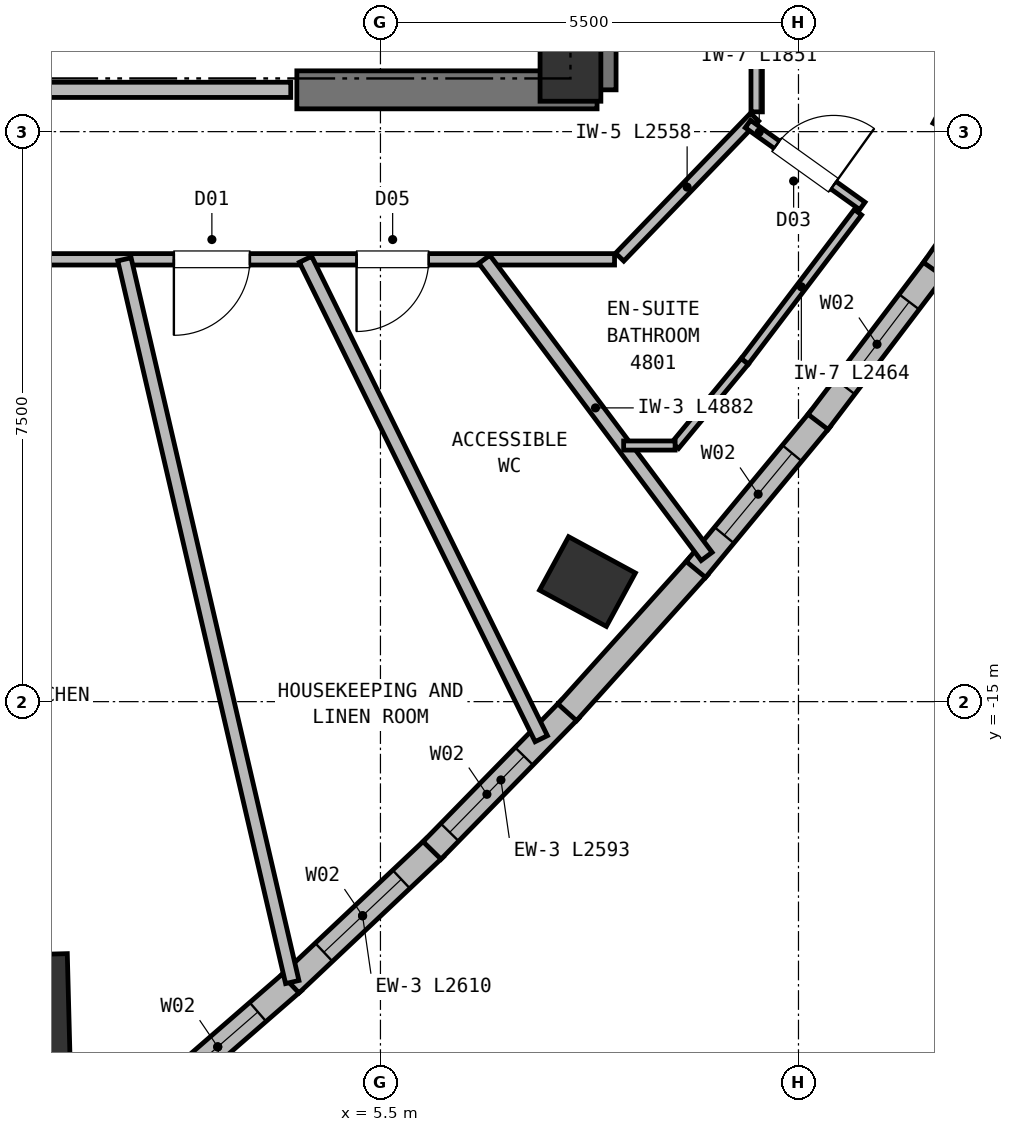
"""IFC4 building model, lengths in metres.
Left out: names, types, materials, properties, quantities, classifications, styles, units other than length and angle.
Written with IfcOpenShell. Run it as: python <this file> out.ifc"""

import sys

from ifc_helpers import new_model, si_unit, direction, frame, frame_2d, origin, origin_2d, place, context, subcontext, project, spatial, rectangle, extrude, element, fill, save


model = new_model("IFC4")
c1 = context("Model", 3, precision=1e-05, world=origin(), true_north=direction((0.0, 1.0)))
c2 = subcontext(c1, "Body", "Model", "MODEL_VIEW")
j1 = project(units=[si_unit("LENGTHUNIT", "METRE"), si_unit("PLANEANGLEUNIT", "RADIAN")], contexts=[c1])
p1 = place(None, origin())
s1 = spatial("IfcSite", under=j1, at=p1, CompositionType="ELEMENT")
p2 = place(p1, origin())
s2 = spatial("IfcBuilding", under=s1, at=p2, CompositionType="ELEMENT")
p3 = place(p2, frame((0.0, 0.0, 182.75)))
s3 = spatial("IfcBuildingStorey", under=s2, at=p3, CompositionType="ELEMENT", Elevation=182.75)
p4 = place(p3, frame((8.0, -6.6, 0.0), z_axis=(0.0, 0.0, 1.0), x_axis=(1.0, 0.0, 0.0)))
e1 = element("IfcColumn", 1, at=p4, inside=s3, PredefinedType="COLUMN", context=c2, shape_type="SweptSolid", body=[
    extrude(rectangle(XDim=0.8, YDim=1.0, at=origin_2d()), origin(), (0.0, 0.0, 1.0), 3.8),
])
p5 = place(p3, frame((4.4, -6.95, 0.0), z_axis=(0.0, 0.0, 1.0), x_axis=(1.0, 0.0, 0.0)))
e2 = element("IfcWall", 2, at=p5, inside=s3, PredefinedType="SHEAR", context=c2, shape_type="SweptSolid", body=[
    extrude(rectangle(XDim=3.95, YDim=0.5, at=frame_2d((1.975, 0.0))), origin(), (0.0, 0.0, 1.0), 3.55),
])
p6 = place(p3, frame((8.35, -6.95, 0.0), z_axis=(0.0, 0.0, 1.0), x_axis=(0.0, 1.0, 0.0)))
e3 = element("IfcWall", 3, at=p6, inside=s3, PredefinedType="SHEAR", context=c2, shape_type="SweptSolid", body=[
    extrude(rectangle(XDim=8.1, YDim=0.5, at=frame_2d((4.05, 0.0))), origin(), (0.0, 0.0, 1.0), 3.55),
])
p7 = place(p3, frame((0.499, -19.064, 0.0), z_axis=(0.0, 0.0, 1.0), x_axis=(-0.026176948308, 0.999657324976, 0.0)))
e4 = element("IfcColumn", 4, at=p7, inside=s3, PredefinedType="COLUMN", context=c2, shape_type="SweptSolid", body=[
    extrude(rectangle(XDim=1.45, YDim=1.8, at=origin_2d()), origin(), (0.0, 0.0, 1.0), 3.8),
])
for number, where, z_axis, x_axis in (
    (5, (8.224, -13.42, 0.0), (0.0, 0.0, 1.0), (0.477, 0.879, 0.0)),
    (6, (13.4, -7.276, 0.0), (0.0, 0.0, 1.0), (0.477, 0.879, 0.0)),
):
    element("IfcColumn", number, at=place(p3, frame(where, z_axis=z_axis, x_axis=x_axis)), inside=s3, PredefinedType="COLUMN", context=c2, shape_type="SweptSolid", body=[
        extrude(rectangle(XDim=0.8, YDim=1.0, at=origin_2d()), origin(), (0.0, 0.0, 1.0), 3.8),
    ])
p8 = place(p3, frame((4.352, -18.679, 0.0), z_axis=(0.0, 0.0, 1.0), x_axis=(-0.754647459821, -0.656130483505, 0.0)))
e7 = element("IfcWall", 7, at=p8, inside=s3, PredefinedType="SOLIDWALL", context=c2, shape_type="SweptSolid", body=[
    extrude(rectangle(XDim=2.632, YDim=0.33, at=frame_2d((1.316, 0.0))), origin(), (0.0, 0.0, 1.0), 3.55),
])
p9 = place(p8, frame((0.616, 0.0, 0.72)))
e8 = element("IfcOpeningElement", 8, at=p9, cuts=e7, PredefinedType="OPENING", context=c2, shape_type="SweptSolid", body=[
    extrude(rectangle(XDim=1.4, YDim=1.84, at=frame_2d((0.7, 0.92))), frame((0.0, 0.175, 0.0), z_axis=(0.0, -1.0, 0.0), x_axis=(1.0, 0.0, 0.0)), (0.0, 0.0, 1.0), 0.35),
])
p10 = place(p3, frame((6.215, -16.922, 0.0), z_axis=(0.0, 0.0, 1.0), x_axis=(-0.72774946529, -0.685843069346, 0.0)))
e9 = element("IfcWall", 9, at=p10, inside=s3, PredefinedType="SOLIDWALL", context=c2, shape_type="SweptSolid", body=[
    extrude(rectangle(XDim=2.61, YDim=0.33, at=frame_2d((1.305, 0.0))), origin(), (0.0, 0.0, 1.0), 3.55),
])
p11 = place(p10, frame((0.605, 0.0, 0.72)))
e10 = element("IfcOpeningElement", 10, at=p11, cuts=e9, PredefinedType="OPENING", context=c2, shape_type="SweptSolid", body=[
    extrude(rectangle(XDim=1.4, YDim=1.84, at=frame_2d((0.7, 0.92))), frame((0.0, 0.175, 0.0), z_axis=(0.0, -1.0, 0.0), x_axis=(1.0, 0.0, 0.0)), (0.0, 0.0, 1.0), 0.35),
])
p12 = place(p3, frame((7.991, -15.104, 0.0), z_axis=(0.0, 0.0, 1.0), x_axis=(-0.699057723408, -0.71506524132, 0.0)))
e11 = element("IfcWall", 11, at=p12, inside=s3, PredefinedType="SOLIDWALL", context=c2, shape_type="SweptSolid", body=[
    extrude(rectangle(XDim=2.593, YDim=0.33, at=frame_2d((1.296, 0.0))), origin(), (0.0, 0.0, 1.0), 3.55),
])
p13 = place(p12, frame((0.86, 0.0, 0.72)))
e12 = element("IfcOpeningElement", 12, at=p13, cuts=e11, PredefinedType="OPENING", context=c2, shape_type="SweptSolid", body=[
    extrude(rectangle(XDim=1.4, YDim=1.84, at=frame_2d((0.7, 0.92))), frame((0.0, 0.175, 0.0), z_axis=(0.0, -1.0, 0.0), x_axis=(1.0, 0.0, 0.0)), (0.0, 0.0, 1.0), 0.35),
])
p14 = place(p3, frame((9.683, -13.223, 0.0), z_axis=(0.0, 0.0, 1.0), x_axis=(-0.668980419183, -0.743280027143, 0.0)))
e13 = element("IfcWall", 13, at=p14, inside=s3, PredefinedType="SOLIDWALL", context=c2, shape_type="SweptSolid", body=[
    extrude(rectangle(XDim=2.579, YDim=0.33, at=frame_2d((1.29, 0.0))), origin(), (0.0, 0.0, 1.0), 3.55),
])
p15 = place(p3, frame((11.289, -11.28, 0.0), z_axis=(0.0, 0.0, 1.0), x_axis=(-0.637443312207, -0.77049725744, 0.0)))
e14 = element("IfcWall", 14, at=p15, inside=s3, PredefinedType="SOLIDWALL", context=c2, shape_type="SweptSolid", body=[
    extrude(rectangle(XDim=2.571, YDim=0.33, at=frame_2d((1.285, 0.0))), origin(), (0.0, 0.0, 1.0), 3.55),
])
p16 = place(p15, frame((0.585, 0.0, 0.72)))
e15 = element("IfcOpeningElement", 15, at=p16, cuts=e14, PredefinedType="OPENING", context=c2, shape_type="SweptSolid", body=[
    extrude(rectangle(XDim=1.4, YDim=1.84, at=frame_2d((0.7, 0.92))), frame((0.0, 0.175, 0.0), z_axis=(0.0, -1.0, 0.0), x_axis=(1.0, 0.0, 0.0)), (0.0, 0.0, 1.0), 0.35),
])
p17 = place(p3, frame((12.809, -9.275, 0.0), z_axis=(0.0, 0.0, 1.0), x_axis=(-0.604617593392, -0.796515891719, 0.0)))
e16 = element("IfcWall", 16, at=p17, inside=s3, PredefinedType="SOLIDWALL", context=c2, shape_type="SweptSolid", body=[
    extrude(rectangle(XDim=2.566, YDim=0.33, at=frame_2d((1.283, 0.0))), origin(), (0.0, 0.0, 1.0), 3.55),
])
p18 = place(p17, frame((0.583, 0.0, 0.72)))
e17 = element("IfcOpeningElement", 17, at=p18, cuts=e16, PredefinedType="OPENING", context=c2, shape_type="SweptSolid", body=[
    extrude(rectangle(XDim=1.4, YDim=1.84, at=frame_2d((0.7, 0.92))), frame((0.0, 0.175, 0.0), z_axis=(0.0, -1.0, 0.0), x_axis=(1.0, 0.0, 0.0)), (0.0, 0.0, 1.0), 0.35),
])
p19 = place(p3, frame((14.244, -7.209, 0.0), z_axis=(0.0, 0.0, 1.0), x_axis=(-0.5707327312, -0.821135889812, 0.0)))
e18 = element("IfcWall", 18, at=p19, inside=s3, PredefinedType="SOLIDWALL", context=c2, shape_type="SweptSolid", body=[
    extrude(rectangle(XDim=2.566, YDim=0.33, at=frame_2d((1.283, 0.0))), origin(), (0.0, 0.0, 1.0), 3.55),
])
p20 = place(p3, frame((-4.32, -6.95, 0.0), z_axis=(0.0, 0.0, 1.0), x_axis=(1.0, 0.0, 0.0)))
e19 = element("IfcWall", 19, at=p20, inside=s3, PredefinedType="PARTITIONING", context=c2, shape_type="SweptSolid", body=[
    extrude(rectangle(XDim=8.64, YDim=0.2, at=frame_2d((4.32, 0.0))), origin(), (0.0, 0.0, 1.0), 3.55),
])
p21 = place(p3, frame((8.58, -9.18, 0.0), z_axis=(0.0, 0.0, 1.0), x_axis=(-1.0, 0.0, 0.0)))
e20 = element("IfcWall", 20, at=p21, inside=s3, PredefinedType="PARTITIONING", context=c2, shape_type="SweptSolid", body=[
    extrude(rectangle(XDim=17.16, YDim=0.15, at=frame_2d((8.58, 0.0))), origin(), (0.0, 0.0, 1.0), 3.23),
])
p22 = place(p21, frame((2.444, 0.0, 0.0)))
e21 = element("IfcOpeningElement", 21, at=p22, cuts=e20, PredefinedType="OPENING", context=c2, shape_type="SweptSolid", body=[
    extrude(rectangle(XDim=0.95, YDim=2.1, at=frame_2d((0.475, 1.05))), frame((0.0, 0.085, 0.0), z_axis=(0.0, -1.0, 0.0), x_axis=(1.0, 0.0, 0.0)), (0.0, 0.0, 1.0), 0.17),
])
p23 = place(p21, frame((4.798, 0.0, 0.0)))
e22 = element("IfcOpeningElement", 22, at=p23, cuts=e20, PredefinedType="OPENING", context=c2, shape_type="SweptSolid", body=[
    extrude(rectangle(XDim=1.0, YDim=2.15, at=frame_2d((0.5, 1.075))), frame((0.0, 0.085, 0.0), z_axis=(0.0, -1.0, 0.0), x_axis=(1.0, 0.0, 0.0)), (0.0, 0.0, 1.0), 0.17),
])
p24 = place(p21, frame((12.096, 0.0, 0.0)))
e23 = element("IfcOpeningElement", 23, at=p24, cuts=e20, PredefinedType="OPENING", context=c2, shape_type="SweptSolid", body=[
    extrude(rectangle(XDim=1.06, YDim=2.15, at=frame_2d((0.53, 1.075))), frame((0.0, 0.085, 0.0), z_axis=(0.0, -1.0, 0.0), x_axis=(1.0, 0.0, 0.0)), (0.0, 0.0, 1.0), 0.17),
])
p25 = place(p21, frame((8.137, 0.0, 0.0)))
e24 = element("IfcOpeningElement", 24, at=p25, cuts=e20, PredefinedType="OPENING", context=c2, shape_type="SweptSolid", body=[
    extrude(rectangle(XDim=1.0, YDim=2.15, at=frame_2d((0.5, 1.075))), frame((0.0, 0.085, 0.0), z_axis=(0.0, -1.0, 0.0), x_axis=(1.0, 0.0, 0.0)), (0.0, 0.0, 1.0), 0.17),
])
p26 = place(p3, frame((10.422, -7.309, 0.0), z_axis=(0.0, 0.0, 1.0), x_axis=(-0.693764562202, -0.720201869085, 0.0)))
e25 = element("IfcWall", 25, at=p26, inside=s3, PredefinedType="PARTITIONING", context=c2, shape_type="SweptSolid", body=[
    extrude(rectangle(XDim=2.558, YDim=0.15, at=frame_2d((1.279, 0.0))), origin(), (0.0, 0.0, 1.0), 3.23),
])
p27 = place(p3, frame((10.45, 7.24, 0.0), z_axis=(0.0, 0.0, 1.0), x_axis=(0.0, -1.0, 0.0)))
e26 = element("IfcWall", 26, at=p27, inside=s3, PredefinedType="PARTITIONING", context=c2, shape_type="SweptSolid", body=[
    extrude(rectangle(XDim=14.48, YDim=0.15, at=frame_2d((7.24, 0.0))), origin(), (0.0, 0.0, 1.0), 3.55),
])
p28 = place(p27, frame((11.674, 0.0, 0.0)))
e27 = element("IfcOpeningElement", 27, at=p28, cuts=e26, PredefinedType="OPENING", context=c2, shape_type="SweptSolid", body=[
    extrude(rectangle(XDim=1.06, YDim=2.15, at=frame_2d((0.53, 1.075))), frame((0.0, 0.085, 0.0), z_axis=(0.0, -1.0, 0.0), x_axis=(1.0, 0.0, 0.0)), (0.0, 0.0, 1.0), 0.17),
])
p29 = place(p27, frame((5.006, 0.0, 0.0)))
e28 = element("IfcOpeningElement", 28, at=p29, cuts=e26, PredefinedType="OPENING", context=c2, shape_type="SweptSolid", body=[
    extrude(rectangle(XDim=1.0, YDim=2.15, at=frame_2d((0.5, 1.075))), frame((0.0, 0.085, 0.0), z_axis=(0.0, -1.0, 0.0), x_axis=(1.0, 0.0, 0.0)), (0.0, 0.0, 1.0), 0.17),
])
p30 = place(p3, frame((6.867, -9.18, 0.0), z_axis=(0.0, 0.0, 1.0), x_axis=(0.598991453889, -0.800755417195, 0.0)))
e29 = element("IfcWall", 29, at=p30, inside=s3, PredefinedType="PARTITIONING", context=c2, shape_type="SweptSolid", body=[
    extrude(rectangle(XDim=4.883, YDim=0.18, at=frame_2d((2.441, 0.0))), origin(), (0.0, 0.0, 1.0), 3.55),
])
p31 = place(p3, frame((10.335, -7.399, 0.0), z_axis=(0.0, 0.0, 1.0), x_axis=(0.813020012063, -0.582235742621, 0.0)))
e30 = element("IfcWall", 30, at=p31, inside=s3, PredefinedType="PARTITIONING", context=c2, shape_type="SweptSolid", body=[
    extrude(rectangle(XDim=1.851, YDim=0.12, at=frame_2d((0.926, 0.0))), origin(), (0.0, 0.0, 1.0), 3.55),
])
p32 = place(p31, frame((0.466, 0.0, 0.0)))
e31 = element("IfcOpeningElement", 31, at=p32, cuts=e30, PredefinedType="OPENING", context=c2, shape_type="SweptSolid", body=[
    extrude(rectangle(XDim=0.92, YDim=2.1, at=frame_2d((0.46, 1.05))), frame((0.0, 0.07, 0.0), z_axis=(0.0, -1.0, 0.0), x_axis=(1.0, 0.0, 0.0)), (0.0, 0.0, 1.0), 0.14),
])
p33 = place(p3, frame((10.293, -10.523, 0.0), z_axis=(0.0, 0.0, 1.0), x_axis=(0.604651038728, 0.796490502998, 0.0)))
e32 = element("IfcWall", 32, at=p33, inside=s3, PredefinedType="PARTITIONING", context=c2, shape_type="SweptSolid", body=[
    extrude(rectangle(XDim=2.464, YDim=0.12, at=frame_2d((1.232, 0.0))), origin(), (0.0, 0.0, 1.0), 3.55),
])
p34 = place(p3, frame((9.377, -11.63, 0.0), z_axis=(0.0, 0.0, 1.0), x_axis=(0.63745644053, 0.770486396003, 0.0)))
e33 = element("IfcWall", 33, at=p34, inside=s3, PredefinedType="PARTITIONING", context=c2, shape_type="SweptSolid", body=[
    extrude(rectangle(XDim=1.437, YDim=0.12, at=frame_2d((0.719, 0.0))), origin(), (0.0, 0.0, 1.0), 3.55),
])
p35 = place(p3, frame((8.7, -11.63, 0.0), z_axis=(0.0, 0.0, 1.0), x_axis=(1.0, 0.0, 0.0)))
e34 = element("IfcWall", 34, at=p35, inside=s3, PredefinedType="PARTITIONING", context=c2, shape_type="SweptSolid", body=[
    extrude(rectangle(XDim=0.677, YDim=0.12, at=frame_2d((0.338, 0.0))), origin(), (0.0, 0.0, 1.0), 3.55),
])
p36 = place(p3, frame((2.132, -9.18, 0.0), z_axis=(0.0, 0.0, 1.0), x_axis=(0.226196232917, -0.974081754379, 0.0)))
e35 = element("IfcWall", 35, at=p36, inside=s3, PredefinedType="PARTITIONING", context=c2, shape_type="SweptSolid", body=[
    extrude(rectangle(XDim=9.762, YDim=0.18, at=frame_2d((4.881, 0.0))), origin(), (0.0, 0.0, 1.0), 3.55),
])
p37 = place(p3, frame((4.514, -9.18, 0.0), z_axis=(0.0, 0.0, 1.0), x_axis=(0.441285267702, -0.897366877319, 0.0)))
e36 = element("IfcWall", 36, at=p37, inside=s3, PredefinedType="PARTITIONING", context=c2, shape_type="SweptSolid", body=[
    extrude(rectangle(XDim=7.029, YDim=0.18, at=frame_2d((3.515, 0.0))), origin(), (0.0, 0.0, 1.0), 3.55),
])
p38 = place(p9, origin())
e37 = element("IfcWindow", 37, at=p38, inside=s3, PartitioningType="SINGLE_PANEL", PredefinedType="WINDOW", context=c2, shape_type="SweptSolid", body=[
    extrude(rectangle(XDim=1.4, YDim=1.84, at=frame_2d((0.7, 0.92))), frame((0.0, 0.03, 0.0), z_axis=(0.0, -1.0, 0.0), x_axis=(1.0, 0.0, 0.0)), (0.0, 0.0, 1.0), 0.06),
])
fill(e8, e37)
p39 = place(p11, origin())
e38 = element("IfcWindow", 38, at=p39, inside=s3, PartitioningType="SINGLE_PANEL", PredefinedType="WINDOW", context=c2, shape_type="SweptSolid", body=[
    extrude(rectangle(XDim=1.4, YDim=1.84, at=frame_2d((0.7, 0.92))), frame((0.0, 0.03, 0.0), z_axis=(0.0, -1.0, 0.0), x_axis=(1.0, 0.0, 0.0)), (0.0, 0.0, 1.0), 0.06),
])
fill(e10, e38)
p40 = place(p13, origin())
e39 = element("IfcWindow", 39, at=p40, inside=s3, PartitioningType="SINGLE_PANEL", PredefinedType="WINDOW", context=c2, shape_type="SweptSolid", body=[
    extrude(rectangle(XDim=1.4, YDim=1.84, at=frame_2d((0.7, 0.92))), frame((0.0, 0.03, 0.0), z_axis=(0.0, -1.0, 0.0), x_axis=(1.0, 0.0, 0.0)), (0.0, 0.0, 1.0), 0.06),
])
fill(e12, e39)
p41 = place(p16, origin())
e40 = element("IfcWindow", 40, at=p41, inside=s3, PartitioningType="SINGLE_PANEL", PredefinedType="WINDOW", context=c2, shape_type="SweptSolid", body=[
    extrude(rectangle(XDim=1.4, YDim=1.84, at=frame_2d((0.7, 0.92))), frame((0.0, 0.03, 0.0), z_axis=(0.0, -1.0, 0.0), x_axis=(1.0, 0.0, 0.0)), (0.0, 0.0, 1.0), 0.06),
])
fill(e15, e40)
p42 = place(p18, origin())
e41 = element("IfcWindow", 41, at=p42, inside=s3, PartitioningType="SINGLE_PANEL", PredefinedType="WINDOW", context=c2, shape_type="SweptSolid", body=[
    extrude(rectangle(XDim=1.4, YDim=1.84, at=frame_2d((0.7, 0.92))), frame((0.0, 0.03, 0.0), z_axis=(0.0, -1.0, 0.0), x_axis=(1.0, 0.0, 0.0)), (0.0, 0.0, 1.0), 0.06),
])
fill(e17, e41)
p43 = place(p32, origin())
e42 = element("IfcDoor", 42, at=p43, inside=s3, OperationType="SINGLE_SWING_RIGHT", PredefinedType="DOOR", context=c2, shape_type="SweptSolid", body=[
    extrude(rectangle(XDim=0.92, YDim=2.1, at=frame_2d((0.46, 1.05))), frame((0.0, 0.025, 0.0), z_axis=(0.0, -1.0, 0.0), x_axis=(1.0, 0.0, 0.0)), (0.0, 0.0, 1.0), 0.05),
])
fill(e31, e42)
p44 = place(p22, origin())
e43 = element("IfcDoor", 43, at=p44, inside=s3, OperationType="SINGLE_SWING_RIGHT", PredefinedType="DOOR", context=c2, shape_type="SweptSolid", body=[
    extrude(rectangle(XDim=0.95, YDim=2.1, at=frame_2d((0.475, 1.05))), frame((0.0, 0.025, 0.0), z_axis=(0.0, -1.0, 0.0), x_axis=(1.0, 0.0, 0.0)), (0.0, 0.0, 1.0), 0.05),
])
fill(e21, e43)
p45 = place(p23, origin())
e44 = element("IfcDoor", 44, at=p45, inside=s3, OperationType="SINGLE_SWING_RIGHT", PredefinedType="DOOR", context=c2, shape_type="SweptSolid", body=[
    extrude(rectangle(XDim=1.0, YDim=2.15, at=frame_2d((0.5, 1.075))), frame((0.0, 0.025, 0.0), z_axis=(0.0, -1.0, 0.0), x_axis=(1.0, 0.0, 0.0)), (0.0, 0.0, 1.0), 0.05),
])
fill(e22, e44)
save(model, sys.argv[1])
